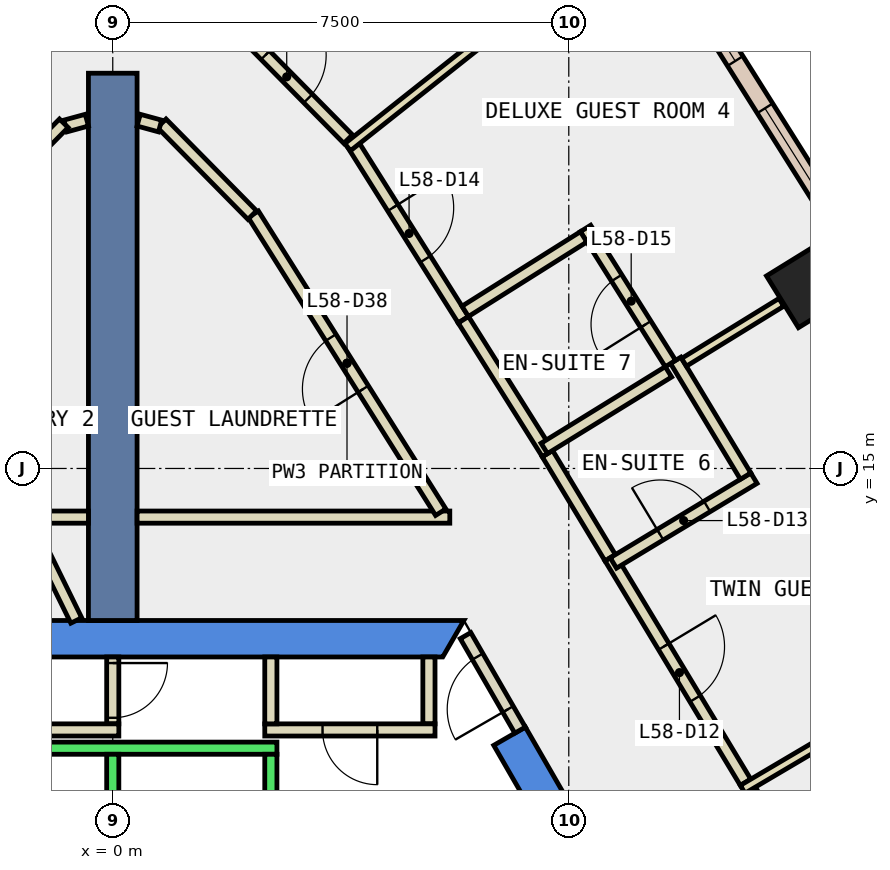
"""IFC4 building model, lengths in metres.
Left out: names, types, materials, properties, quantities, classifications, styles, units other than length and angle.
Written with IfcOpenShell. Run it as: python <this file> out.ifc"""

import sys

from ifc_helpers import new_model, si_unit, direction, frame, frame_2d, origin, origin_2d, place, context, subcontext, project, spatial, polyline, rectangle, outline, extrude, element, fill, save


model = new_model("IFC4")
c1 = context("Model", 3, precision=1e-05, world=origin(), true_north=direction((0.0, 1.0)))
c2 = subcontext(c1, "Body", "Model", "MODEL_VIEW")
j1 = project(units=[si_unit("LENGTHUNIT", "METRE"), si_unit("PLANEANGLEUNIT", "RADIAN")], contexts=[c1])
p1 = place(None, origin())
s1 = spatial("IfcSite", under=j1, at=p1, CompositionType="ELEMENT")
p2 = place(p1, origin())
s2 = spatial("IfcBuilding", under=s1, at=p2, CompositionType="ELEMENT")
p3 = place(p2, frame((0.0, 0.0, 255.8)))
s3 = spatial("IfcBuildingStorey", under=s2, at=p3, CompositionType="ELEMENT", Elevation=255.8)
p4 = place(p3, frame((11.61, 18.109, -0.34), z_axis=(0.0, 0.0, 1.0), x_axis=(-0.525575593337, 0.850746904601, 0.0)))
e1 = element("IfcColumn", 1, at=p4, inside=s3, PredefinedType="COLUMN", context=c2, shape_type="SweptSolid", body=[
    extrude(rectangle(XDim=1.0, YDim=1.4, at=origin_2d()), origin(), (0.0, 0.0, 1.0), 3.6),
])
p5 = place(p3, frame((0.0, 0.0, -0.34)))
e2 = element("IfcWall", 2, at=p5, inside=s3, PredefinedType="SHEAR", context=c2, shape_type="SweptSolid", body=[
    extrude(outline(polyline([(6.786, 10.747), (6.266, 10.447), (10.854, 2.5), (11.547, 2.5), (6.786, 10.747)])), origin(), (0.0, 0.0, 1.0), 3.6),
])
p6 = place(p3, frame((0.0, 0.0, -0.34)))
e3 = element("IfcWall", 3, at=p6, inside=s3, PredefinedType="SHEAR", context=c2, shape_type="SweptSolid", body=[
    extrude(outline(polyline([(5.774, 12.5), (-5.774, 12.5), (-5.427, 11.9), (5.427, 11.9), (5.774, 12.5)])), origin(), (0.0, 0.0, 1.0), 3.6),
])
p7 = place(p3, frame((0.0, 12.5, -0.34), z_axis=(0.0, 0.0, 1.0), x_axis=(0.0, 1.0, 0.0)))
e4 = element("IfcWall", 4, at=p7, inside=s3, PredefinedType="SHEAR", context=c2, shape_type="SweptSolid", body=[
    extrude(rectangle(XDim=9.0, YDim=0.8, at=frame_2d((4.5, 0.0))), origin(), (0.0, 0.0, 1.0), 3.6),
])
p8 = place(p3, frame((11.983, 18.926, 0.0), z_axis=(0.0, 0.0, 1.0), x_axis=(-0.532558226688, 0.846393369059, 0.0)))
e5 = element("IfcWall", 5, at=p8, inside=s3, PredefinedType="STANDARD", context=c2, shape_type="SweptSolid", body=[
    extrude(rectangle(XDim=5.637, YDim=0.3, at=frame_2d((2.818, 0.0))), origin(), (0.0, 0.0, 1.0), 3.26),
])
p9 = place(p8, frame((0.459, 0.0, 0.9)))
e6 = element("IfcOpeningElement", 6, at=p9, cuts=e5, PredefinedType="OPENING", context=c2, shape_type="SweptSolid", body=[
    extrude(rectangle(XDim=1.9, YDim=2.0, at=frame_2d((0.95, 1.0))), frame((0.0, 0.16, 0.0), z_axis=(0.0, -1.0, 0.0), x_axis=(1.0, 0.0, 0.0)), (0.0, 0.0, 1.0), 0.32),
])
p10 = place(p8, frame((3.278, 0.0, 0.9)))
e7 = element("IfcOpeningElement", 7, at=p10, cuts=e5, PredefinedType="OPENING", context=c2, shape_type="SweptSolid", body=[
    extrude(rectangle(XDim=1.9, YDim=2.0, at=frame_2d((0.95, 1.0))), frame((0.0, 0.16, 0.0), z_axis=(0.0, -1.0, 0.0), x_axis=(1.0, 0.0, 0.0)), (0.0, 0.0, 1.0), 0.32),
])
p11 = place(p3, frame((-0.6, 12.5, 0.0), z_axis=(0.0, 0.0, 1.0), x_axis=(-0.440531456598, 0.897737175206, 0.0)))
e8 = element("IfcWall", 8, at=p11, inside=s3, PredefinedType="PARTITIONING", context=c2, shape_type="SweptSolid", body=[
    extrude(rectangle(XDim=1.918, YDim=0.2, at=frame_2d((0.959, 0.0))), origin(), (0.0, 0.0, 1.0), 3.26),
])
p12 = place(p3, frame((0.4, 14.2, 0.0), z_axis=(0.0, 0.0, 1.0), x_axis=(1.0, 0.0, 0.0)))
e9 = element("IfcWall", 9, at=p12, inside=s3, PredefinedType="PARTITIONING", context=c2, shape_type="SweptSolid", body=[
    extrude(rectangle(XDim=5.143, YDim=0.2, at=frame_2d((2.572, 0.0))), origin(), (0.0, 0.0, 1.0), 3.26),
])
p13 = place(p3, frame((5.394, 14.281, 0.0), z_axis=(0.0, 0.0, 1.0), x_axis=(-0.532551510955, 0.846397594621, 0.0)))
e10 = element("IfcWall", 10, at=p13, inside=s3, PredefinedType="PARTITIONING", context=c2, shape_type="SweptSolid", body=[
    extrude(rectangle(XDim=5.789, YDim=0.2, at=frame_2d((2.895, 0.0))), origin(), (0.0, 0.0, 1.0), 3.26),
])
p14 = place(p13, frame((2.394, 0.0, 0.0)))
e11 = element("IfcOpeningElement", 11, at=p14, cuts=e10, PredefinedType="OPENING", context=c2, shape_type="SweptSolid", body=[
    extrude(rectangle(XDim=1.0, YDim=2.1, at=frame_2d((0.5, 1.05))), frame((0.0, 0.11, 0.0), z_axis=(0.0, -1.0, 0.0), x_axis=(1.0, 0.0, 0.0)), (0.0, 0.0, 1.0), 0.22),
])
p15 = place(p3, frame((2.294, 19.167, 0.0), z_axis=(0.0, 0.0, 1.0), x_axis=(-0.70213913596, 0.712039769784, 0.0)))
e12 = element("IfcWall", 12, at=p15, inside=s3, PredefinedType="PARTITIONING", context=c2, shape_type="SweptSolid", body=[
    extrude(rectangle(XDim=2.121, YDim=0.2, at=frame_2d((1.06, 0.0))), origin(), (0.0, 0.0, 1.0), 3.26),
])
p16 = place(p3, frame((0.778, 20.632, 0.0), z_axis=(0.0, 0.0, 1.0), x_axis=(-0.964810127056, 0.262947558899, 0.0)))
e13 = element("IfcWall", 13, at=p16, inside=s3, PredefinedType="PARTITIONING", context=c2, shape_type="SweptSolid", body=[
    extrude(rectangle(XDim=0.365, YDim=0.2, at=frame_2d((0.183, 0.0))), origin(), (0.0, 0.0, 1.0), 3.26),
])
p17 = place(p3, frame((-1.334, 14.2, 0.0), z_axis=(0.0, 0.0, 1.0), x_axis=(1.0, 0.0, 0.0)))
e14 = element("IfcWall", 14, at=p17, inside=s3, PredefinedType="PARTITIONING", context=c2, shape_type="SweptSolid", body=[
    extrude(rectangle(XDim=0.934, YDim=0.2, at=frame_2d((0.467, 0.0))), origin(), (0.0, 0.0, 1.0), 3.26),
])
p18 = place(p3, frame((-0.426, 20.728, 0.0), z_axis=(0.0, 0.0, 1.0), x_axis=(-0.964810127056, -0.262947558899, 0.0)))
e15 = element("IfcWall", 15, at=p18, inside=s3, PredefinedType="PARTITIONING", context=c2, shape_type="SweptSolid", body=[
    extrude(rectangle(XDim=0.365, YDim=0.2, at=frame_2d((0.183, 0.0))), origin(), (0.0, 0.0, 1.0), 3.26),
])
p19 = place(p3, frame((-0.805, 20.677, 0.0), z_axis=(0.0, 0.0, 1.0), x_axis=(-0.70213913596, -0.712039769784, 0.0)))
e16 = element("IfcWall", 16, at=p19, inside=s3, PredefinedType="PARTITIONING", context=c2, shape_type="SweptSolid", body=[
    extrude(rectangle(XDim=2.121, YDim=0.2, at=frame_2d((1.06, 0.0))), origin(), (0.0, 0.0, 1.0), 3.26),
])
p20 = place(p3, frame((10.484, 9.71, 0.0), z_axis=(0.0, 0.0, 1.0), x_axis=(0.500034145141, -0.866005689181, 0.0)))
e17 = element("IfcWall", 17, at=p20, inside=s3, PredefinedType="PARTITIONING", context=c2, shape_type="SweptSolid", body=[
    extrude(rectangle(XDim=3.91, YDim=0.2, at=frame_2d((1.955, 0.0))), origin(), (0.0, 0.0, 1.0), 3.26),
])
p21 = place(p20, frame((1.505, 0.0, 0.0)))
e18 = element("IfcOpeningElement", 18, at=p21, cuts=e17, PredefinedType="OPENING", context=c2, shape_type="SweptSolid", body=[
    extrude(rectangle(XDim=1.0, YDim=2.1, at=frame_2d((0.5, 1.05))), frame((0.0, 0.11, 0.0), z_axis=(0.0, -1.0, 0.0), x_axis=(1.0, 0.0, 0.0)), (0.0, 0.0, 1.0), 0.22),
])
p22 = place(p3, frame((8.181, 13.532, 0.0), z_axis=(0.0, 0.0, 1.0), x_axis=(0.51625987265, -0.856431984393, 0.0)))
e19 = element("IfcWall", 19, at=p22, inside=s3, PredefinedType="PARTITIONING", context=c2, shape_type="SweptSolid", body=[
    extrude(rectangle(XDim=4.312, YDim=0.2, at=frame_2d((2.156, 0.0))), origin(), (0.0, 0.0, 1.0), 3.26),
])
p23 = place(p22, frame((1.706, 0.0, 0.0)))
e20 = element("IfcOpeningElement", 20, at=p23, cuts=e19, PredefinedType="OPENING", context=c2, shape_type="SweptSolid", body=[
    extrude(rectangle(XDim=1.0, YDim=2.1, at=frame_2d((0.5, 1.05))), frame((0.0, 0.11, 0.0), z_axis=(0.0, -1.0, 0.0), x_axis=(1.0, 0.0, 0.0)), (0.0, 0.0, 1.0), 0.22),
])
p24 = place(p3, frame((7.148, 15.245, 0.0), z_axis=(0.0, 0.0, 1.0), x_axis=(0.516361066184, -0.856370976463, 0.0)))
e21 = element("IfcWall", 21, at=p24, inside=s3, PredefinedType="PARTITIONING", context=c2, shape_type="SweptSolid", body=[
    extrude(rectangle(XDim=2.0, YDim=0.2, at=frame_2d((1.0, 0.0))), origin(), (0.0, 0.0, 1.0), 3.26),
])
p25 = place(p3, frame((3.928, 20.367, 0.0), z_axis=(0.0, 0.0, 1.0), x_axis=(0.532616247911, -0.846356858814, 0.0)))
e22 = element("IfcWall", 22, at=p25, inside=s3, PredefinedType="PARTITIONING", context=c2, shape_type="SweptSolid", body=[
    extrude(rectangle(XDim=3.451, YDim=0.2, at=frame_2d((1.726, 0.0))), origin(), (0.0, 0.0, 1.0), 3.26),
])
p26 = place(p25, frame((1.275, 0.0, 0.0)))
e23 = element("IfcOpeningElement", 23, at=p26, cuts=e22, PredefinedType="OPENING", context=c2, shape_type="SweptSolid", body=[
    extrude(rectangle(XDim=1.0, YDim=2.1, at=frame_2d((0.5, 1.05))), frame((0.0, 0.11, 0.0), z_axis=(0.0, -1.0, 0.0), x_axis=(1.0, 0.0, 0.0)), (0.0, 0.0, 1.0), 0.22),
])
p27 = place(p3, frame((5.766, 17.446, 0.0), z_axis=(0.0, 0.0, 1.0), x_axis=(0.532437006176, -0.846469629966, 0.0)))
e24 = element("IfcWall", 24, at=p27, inside=s3, PredefinedType="PARTITIONING", context=c2, shape_type="SweptSolid", body=[
    extrude(rectangle(XDim=2.599, YDim=0.2, at=frame_2d((1.299, 0.0))), origin(), (0.0, 0.0, 1.0), 3.26),
])
p28 = place(p3, frame((1.851, 22.464, 0.0), z_axis=(0.0, 0.0, 1.0), x_axis=(0.70237969133, -0.711802479068, 0.0)))
e25 = element("IfcWall", 25, at=p28, inside=s3, PredefinedType="PARTITIONING", context=c2, shape_type="SweptSolid", body=[
    extrude(rectangle(XDim=2.876, YDim=0.2, at=frame_2d((1.438, 0.0))), origin(), (0.0, 0.0, 1.0), 3.26),
])
p29 = place(p28, frame((0.938, 0.0, 0.0)))
e26 = element("IfcOpeningElement", 26, at=p29, cuts=e25, PredefinedType="OPENING", context=c2, shape_type="SweptSolid", body=[
    extrude(rectangle(XDim=1.0, YDim=2.1, at=frame_2d((0.5, 1.05))), frame((0.0, 0.11, 0.0), z_axis=(0.0, -1.0, 0.0), x_axis=(1.0, 0.0, 0.0)), (0.0, 0.0, 1.0), 0.22),
])
p30 = place(p3, frame((5.2, 11.9, 0.0), z_axis=(0.0, 0.0, 1.0), x_axis=(0.0, -1.0, 0.0)))
e27 = element("IfcWall", 27, at=p30, inside=s3, PredefinedType="PARTITIONING", context=c2, shape_type="SweptSolid", body=[
    extrude(rectangle(XDim=1.1, YDim=0.2, at=frame_2d((0.55, 0.0))), origin(), (0.0, 0.0, 1.0), 3.26),
])
p31 = place(p3, frame((5.3, 10.7, 0.0), z_axis=(0.0, 0.0, 1.0), x_axis=(-1.0, 0.0, 0.0)))
e28 = element("IfcWall", 28, at=p31, inside=s3, PredefinedType="PARTITIONING", context=c2, shape_type="SweptSolid", body=[
    extrude(rectangle(XDim=2.8, YDim=0.2, at=frame_2d((1.4, 0.0))), origin(), (0.0, 0.0, 1.0), 3.26),
])
p32 = place(p31, frame((0.95, 0.0, 0.0)))
e29 = element("IfcOpeningElement", 29, at=p32, cuts=e28, PredefinedType="OPENING", context=c2, shape_type="SweptSolid", body=[
    extrude(rectangle(XDim=0.9, YDim=2.1, at=frame_2d((0.45, 1.05))), frame((0.0, 0.11, 0.0), z_axis=(0.0, -1.0, 0.0), x_axis=(1.0, 0.0, 0.0)), (0.0, 0.0, 1.0), 0.22),
])
p33 = place(p3, frame((2.6, 10.8, 0.0), z_axis=(0.0, 0.0, 1.0), x_axis=(0.0, 1.0, 0.0)))
e30 = element("IfcWall", 30, at=p33, inside=s3, PredefinedType="PARTITIONING", context=c2, shape_type="SweptSolid", body=[
    extrude(rectangle(XDim=1.1, YDim=0.2, at=frame_2d((0.55, 0.0))), origin(), (0.0, 0.0, 1.0), 3.26),
])
p34 = place(p3, frame((0.0, 11.9, 0.0), z_axis=(0.0, 0.0, 1.0), x_axis=(0.0, -1.0, 0.0)))
e31 = element("IfcWall", 31, at=p34, inside=s3, PredefinedType="PARTITIONING", context=c2, shape_type="SweptSolid", body=[
    extrude(rectangle(XDim=1.1, YDim=0.2, at=frame_2d((0.55, 0.0))), origin(), (0.0, 0.0, 1.0), 3.26),
])
p35 = place(p34, frame((0.1, 0.0, 0.0)))
e32 = element("IfcOpeningElement", 32, at=p35, cuts=e31, PredefinedType="OPENING", context=c2, shape_type="SweptSolid", body=[
    extrude(rectangle(XDim=0.9, YDim=2.1, at=frame_2d((0.45, 1.05))), frame((0.0, 0.11, 0.0), z_axis=(0.0, -1.0, 0.0), x_axis=(1.0, 0.0, 0.0)), (0.0, 0.0, 1.0), 0.22),
])
p36 = place(p3, frame((0.1, 10.7, 0.0), z_axis=(0.0, 0.0, 1.0), x_axis=(-1.0, 0.0, 0.0)))
e33 = element("IfcWall", 33, at=p36, inside=s3, PredefinedType="PARTITIONING", context=c2, shape_type="SweptSolid", body=[
    extrude(rectangle(XDim=2.8, YDim=0.2, at=frame_2d((1.4, 0.0))), origin(), (0.0, 0.0, 1.0), 3.26),
])
p37 = place(p3, frame((10.36, 9.724, 0.0), z_axis=(0.0, 0.0, 1.0), x_axis=(0.861211954005, 0.508245974188, 0.0)))
e34 = element("IfcWall", 34, at=p37, inside=s3, PredefinedType="PARTITIONING", context=c2, shape_type="SweptSolid", body=[
    extrude(rectangle(XDim=4.681, YDim=0.15, at=frame_2d((2.34, 0.0))), origin(), (0.0, 0.0, 1.0), 3.26),
])
p38 = place(p3, frame((8.233, 13.446, 0.0), z_axis=(0.0, 0.0, 1.0), x_axis=(0.856373825811, 0.516356340589, 0.0)))
e35 = element("IfcWall", 35, at=p38, inside=s3, PredefinedType="PARTITIONING", context=c2, shape_type="SweptSolid", body=[
    extrude(rectangle(XDim=2.7, YDim=0.2, at=frame_2d((1.35, 0.0))), origin(), (0.0, 0.0, 1.0), 3.26),
])
p39 = place(p38, frame((0.9, 0.0, 0.0)))
e36 = element("IfcOpeningElement", 36, at=p39, cuts=e35, PredefinedType="OPENING", context=c2, shape_type="SweptSolid", body=[
    extrude(rectangle(XDim=0.9, YDim=2.1, at=frame_2d((0.45, 1.05))), frame((0.0, 0.11, 0.0), z_axis=(0.0, -1.0, 0.0), x_axis=(1.0, 0.0, 0.0)), (0.0, 0.0, 1.0), 0.22),
])
p40 = place(p3, frame((10.408, 14.874, 0.0), z_axis=(0.0, 0.0, 1.0), x_axis=(-0.516768967276, 0.856124894195, 0.0)))
e37 = element("IfcWall", 37, at=p40, inside=s3, PredefinedType="PARTITIONING", context=c2, shape_type="SweptSolid", body=[
    extrude(rectangle(XDim=2.225, YDim=0.2, at=frame_2d((1.113, 0.0))), origin(), (0.0, 0.0, 1.0), 3.26),
])
p41 = place(p3, frame((9.395, 16.746, 0.0), z_axis=(0.0, 0.0, 1.0), x_axis=(0.851524542888, 0.524314745987, 0.0)))
e38 = element("IfcWall", 38, at=p41, inside=s3, PredefinedType="PARTITIONING", context=c2, shape_type="SweptSolid", body=[
    extrude(rectangle(XDim=1.88, YDim=0.15, at=frame_2d((0.94, 0.0))), origin(), (0.0, 0.0, 1.0), 3.26),
])
p42 = place(p3, frame((7.097, 15.33, 0.0), z_axis=(0.0, 0.0, 1.0), x_axis=(0.851207242031, 0.524829716302, 0.0)))
e39 = element("IfcWall", 39, at=p42, inside=s3, PredefinedType="PARTITIONING", context=c2, shape_type="SweptSolid", body=[
    extrude(rectangle(XDim=2.399, YDim=0.2, at=frame_2d((1.199, 0.0))), origin(), (0.0, 0.0, 1.0), 3.26),
])
p43 = place(p3, frame((9.172, 16.725, 0.0), z_axis=(0.0, 0.0, 1.0), x_axis=(-0.532329646536, 0.846537150643, 0.0)))
e40 = element("IfcWall", 40, at=p43, inside=s3, PredefinedType="PARTITIONING", context=c2, shape_type="SweptSolid", body=[
    extrude(rectangle(XDim=2.625, YDim=0.2, at=frame_2d((1.312, 0.0))), origin(), (0.0, 0.0, 1.0), 3.26),
])
p44 = place(p43, frame((0.763, 0.0, 0.0)))
e41 = element("IfcOpeningElement", 41, at=p44, cuts=e40, PredefinedType="OPENING", context=c2, shape_type="SweptSolid", body=[
    extrude(rectangle(XDim=0.9, YDim=2.1, at=frame_2d((0.45, 1.05))), frame((0.0, 0.11, 0.0), z_axis=(0.0, -1.0, 0.0), x_axis=(1.0, 0.0, 0.0)), (0.0, 0.0, 1.0), 0.22),
])
p45 = place(p3, frame((7.744, 18.809, 0.0), z_axis=(0.0, 0.0, 1.0), x_axis=(-0.846360434059, -0.532610566605, 0.0)))
e42 = element("IfcWall", 42, at=p45, inside=s3, PredefinedType="PARTITIONING", context=c2, shape_type="SweptSolid", body=[
    extrude(rectangle(XDim=2.3, YDim=0.2, at=frame_2d((1.15, 0.0))), origin(), (0.0, 0.0, 1.0), 3.26),
])
p46 = place(p3, frame((3.863, 20.284, 0.0), z_axis=(0.0, 0.0, 1.0), x_axis=(0.783618453885, 0.621242399335, 0.0)))
e43 = element("IfcWall", 43, at=p46, inside=s3, PredefinedType="PARTITIONING", context=c2, shape_type="SweptSolid", body=[
    extrude(rectangle(XDim=4.717, YDim=0.15, at=frame_2d((2.358, 0.0))), origin(), (0.0, 0.0, 1.0), 3.26),
])
p47 = place(p3, frame((6.699, 10.697, 0.0), z_axis=(0.0, 0.0, 1.0), x_axis=(-0.499914839587, 0.866074565589, 0.0)))
e44 = element("IfcWall", 44, at=p47, inside=s3, PredefinedType="PARTITIONING", context=c2, shape_type="SweptSolid", body=[
    extrude(rectangle(XDim=1.794, YDim=0.2, at=frame_2d((0.897, 0.0))), origin(), (0.0, 0.0, 1.0), 2.4),
])
p48 = place(p47, frame((0.397, 0.0, 0.0)))
e45 = element("IfcOpeningElement", 45, at=p48, cuts=e44, PredefinedType="OPENING", context=c2, shape_type="SweptSolid", body=[
    extrude(rectangle(XDim=1.0, YDim=2.1, at=frame_2d((0.5, 1.05))), frame((0.0, 0.11, 0.0), z_axis=(0.0, -1.0, 0.0), x_axis=(1.0, 0.0, 0.0)), (0.0, 0.0, 1.0), 0.22),
])
p49 = place(p3, frame((2.7, 10.4, 0.0), z_axis=(0.0, 0.0, 1.0), x_axis=(-1.0, 0.0, 0.0)))
e46 = element("IfcWall", 46, at=p49, inside=s3, PredefinedType="STANDARD", context=c2, shape_type="SweptSolid", body=[
    extrude(rectangle(XDim=5.4, YDim=0.2, at=frame_2d((2.7, 0.0))), origin(), (0.0, 0.0, 1.0), 3.26),
])
for number, where, z_axis, x_axis in (
    (47, (2.6, 7.9, 0.0), (0.0, 0.0, 1.0), (0.0, 1.0, 0.0)),
    (48, (0.0, 7.9, 0.0), (0.0, 0.0, 1.0), (0.0, 1.0, 0.0)),
):
    element("IfcWall", number, at=place(p3, frame(where, z_axis=z_axis, x_axis=x_axis)), inside=s3, PredefinedType="STANDARD", context=c2, shape_type="SweptSolid", body=[
        extrude(rectangle(XDim=2.4, YDim=0.2, at=frame_2d((1.2, 0.0))), origin(), (0.0, 0.0, 1.0), 3.26),
    ])
p50 = place(p9, origin())
e49 = element("IfcWindow", 49, at=p50, inside=s3, PartitioningType="SINGLE_PANEL", PredefinedType="WINDOW", context=c2, shape_type="SweptSolid", body=[
    extrude(rectangle(XDim=1.9, YDim=2.0, at=frame_2d((0.95, 1.0))), frame((0.0, 0.03, 0.0), z_axis=(0.0, -1.0, 0.0), x_axis=(1.0, 0.0, 0.0)), (0.0, 0.0, 1.0), 0.06),
])
fill(e6, e49)
p51 = place(p10, origin())
e50 = element("IfcWindow", 50, at=p51, inside=s3, PartitioningType="SINGLE_PANEL", PredefinedType="WINDOW", context=c2, shape_type="SweptSolid", body=[
    extrude(rectangle(XDim=1.9, YDim=2.0, at=frame_2d((0.95, 1.0))), frame((0.0, 0.03, 0.0), z_axis=(0.0, -1.0, 0.0), x_axis=(1.0, 0.0, 0.0)), (0.0, 0.0, 1.0), 0.06),
])
fill(e7, e50)
p52 = place(p23, origin())
e51 = element("IfcDoor", 51, at=p52, inside=s3, OperationType="SINGLE_SWING_LEFT", PredefinedType="DOOR", context=c2, shape_type="SweptSolid", body=[
    extrude(rectangle(XDim=1.0, YDim=2.1, at=frame_2d((0.5, 1.05))), frame((0.0, 0.025, 0.0), z_axis=(0.0, -1.0, 0.0), x_axis=(1.0, 0.0, 0.0)), (0.0, 0.0, 1.0), 0.05),
])
fill(e20, e51)
p53 = place(p39, origin())
e52 = element("IfcDoor", 52, at=p53, inside=s3, OperationType="SINGLE_SWING_LEFT", PredefinedType="DOOR", context=c2, shape_type="SweptSolid", body=[
    extrude(rectangle(XDim=0.9, YDim=2.1, at=frame_2d((0.45, 1.05))), frame((0.0, 0.025, 0.0), z_axis=(0.0, -1.0, 0.0), x_axis=(1.0, 0.0, 0.0)), (0.0, 0.0, 1.0), 0.05),
])
fill(e36, e52)
p54 = place(p26, origin())
e53 = element("IfcDoor", 53, at=p54, inside=s3, OperationType="SINGLE_SWING_LEFT", PredefinedType="DOOR", context=c2, shape_type="SweptSolid", body=[
    extrude(rectangle(XDim=1.0, YDim=2.1, at=frame_2d((0.5, 1.05))), frame((0.0, 0.025, 0.0), z_axis=(0.0, -1.0, 0.0), x_axis=(1.0, 0.0, 0.0)), (0.0, 0.0, 1.0), 0.05),
])
fill(e23, e53)
p55 = place(p44, origin())
e54 = element("IfcDoor", 54, at=p55, inside=s3, OperationType="SINGLE_SWING_LEFT", PredefinedType="DOOR", context=c2, shape_type="SweptSolid", body=[
    extrude(rectangle(XDim=0.9, YDim=2.1, at=frame_2d((0.45, 1.05))), frame((0.0, 0.025, 0.0), z_axis=(0.0, -1.0, 0.0), x_axis=(1.0, 0.0, 0.0)), (0.0, 0.0, 1.0), 0.05),
])
fill(e41, e54)
p56 = place(p29, origin())
e55 = element("IfcDoor", 55, at=p56, inside=s3, OperationType="SINGLE_SWING_LEFT", PredefinedType="DOOR", context=c2, shape_type="SweptSolid", body=[
    extrude(rectangle(XDim=1.0, YDim=2.1, at=frame_2d((0.5, 1.05))), frame((0.0, 0.025, 0.0), z_axis=(0.0, -1.0, 0.0), x_axis=(1.0, 0.0, 0.0)), (0.0, 0.0, 1.0), 0.05),
])
fill(e26, e55)
p57 = place(p14, origin())
e56 = element("IfcDoor", 56, at=p57, inside=s3, OperationType="SINGLE_SWING_LEFT", PredefinedType="DOOR", context=c2, shape_type="SweptSolid", body=[
    extrude(rectangle(XDim=1.0, YDim=2.1, at=frame_2d((0.5, 1.05))), frame((0.0, 0.025, 0.0), z_axis=(0.0, -1.0, 0.0), x_axis=(1.0, 0.0, 0.0)), (0.0, 0.0, 1.0), 0.05),
])
fill(e11, e56)
p58 = place(p32, origin())
e57 = element("IfcDoor", 57, at=p58, inside=s3, OperationType="SINGLE_SWING_RIGHT", PredefinedType="DOOR", context=c2, shape_type="SweptSolid", body=[
    extrude(rectangle(XDim=0.9, YDim=2.1, at=frame_2d((0.45, 1.05))), frame((0.0, 0.025, 0.0), z_axis=(0.0, -1.0, 0.0), x_axis=(1.0, 0.0, 0.0)), (0.0, 0.0, 1.0), 0.05),
])
fill(e29, e57)
p59 = place(p35, origin())
e58 = element("IfcDoor", 58, at=p59, inside=s3, OperationType="SINGLE_SWING_LEFT", PredefinedType="DOOR", context=c2, shape_type="SweptSolid", body=[
    extrude(rectangle(XDim=0.9, YDim=2.1, at=frame_2d((0.45, 1.05))), frame((0.0, 0.025, 0.0), z_axis=(0.0, -1.0, 0.0), x_axis=(1.0, 0.0, 0.0)), (0.0, 0.0, 1.0), 0.05),
])
fill(e32, e58)
p60 = place(p48, origin())
e59 = element("IfcDoor", 59, at=p60, inside=s3, OperationType="SINGLE_SWING_LEFT", PredefinedType="DOOR", context=c2, shape_type="SweptSolid", body=[
    extrude(rectangle(XDim=1.0, YDim=2.1, at=frame_2d((0.5, 1.05))), frame((0.0, 0.025, 0.0), z_axis=(0.0, -1.0, 0.0), x_axis=(1.0, 0.0, 0.0)), (0.0, 0.0, 1.0), 0.05),
])
fill(e45, e59)
save(model, sys.argv[1])
